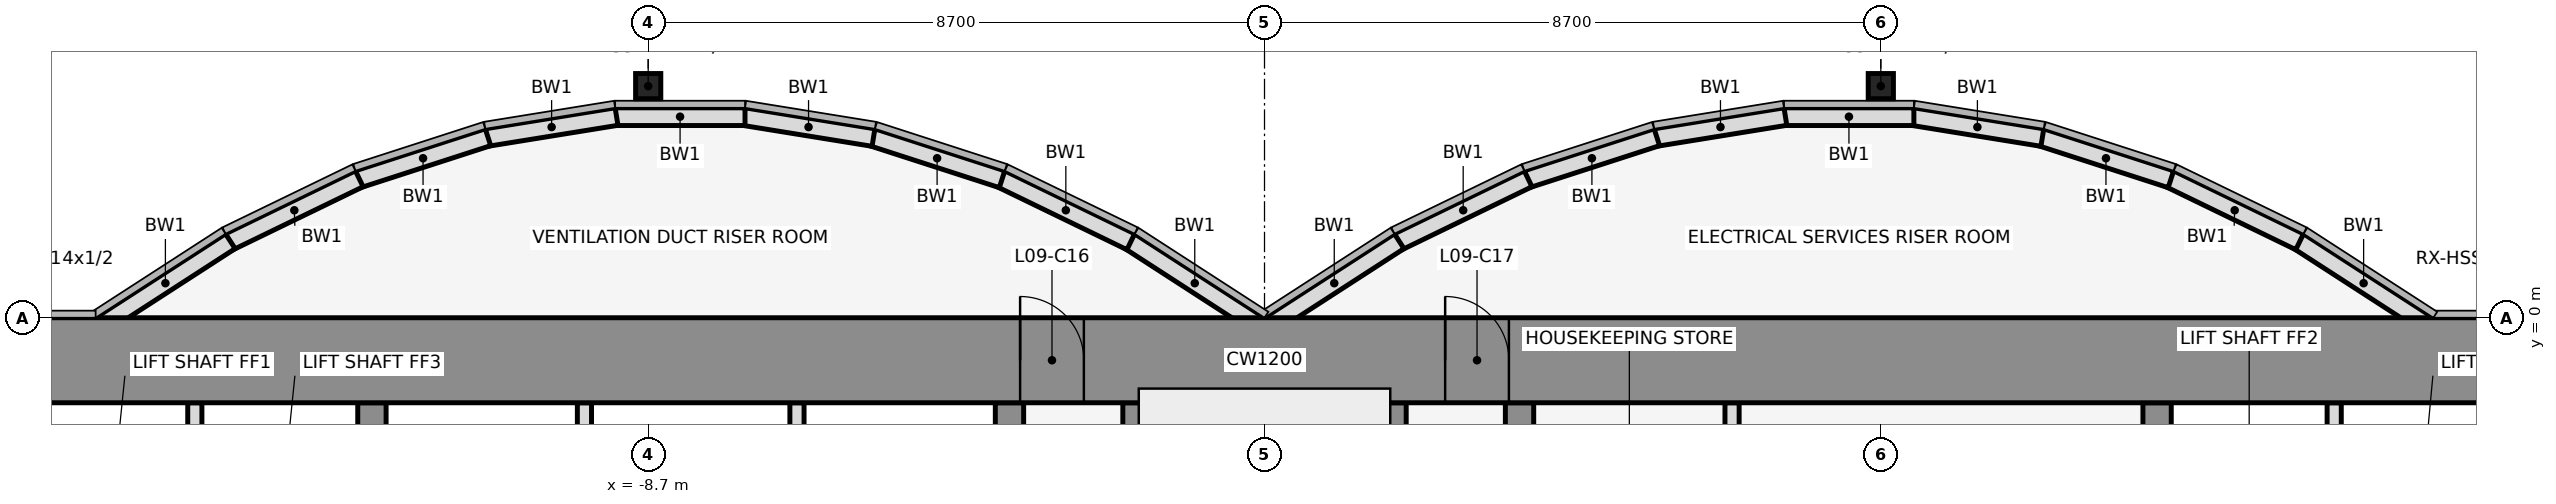
"""IFC4 building model, lengths in metres.
Left out: names, types, materials, properties, quantities, classifications, styles, units other than length and angle.
Written with IfcOpenShell. Run it as: python <this file> out.ifc"""

import sys

from ifc_helpers import new_model, si_unit, direction, frame, frame_2d, origin, origin_2d, place, context, subcontext, project, spatial, rectangle, hollow_rectangle, extrude, element, fill, save


model = new_model("IFC4")
c1 = context("Model", 3, precision=1e-05, world=origin(), true_north=direction((0.0, 1.0)))
c2 = subcontext(c1, "Body", "Model", "MODEL_VIEW")
j1 = project(units=[si_unit("LENGTHUNIT", "METRE"), si_unit("PLANEANGLEUNIT", "RADIAN")], contexts=[c1])
p1 = place(None, origin())
s1 = spatial("IfcSite", under=j1, at=p1, CompositionType="ELEMENT")
p2 = place(p1, origin())
s2 = spatial("IfcBuilding", under=s1, at=p2, CompositionType="ELEMENT")
p3 = place(p2, frame((0.0, 0.0, 48.5)))
s3 = spatial("IfcBuildingStorey", under=s2, at=p3, CompositionType="ELEMENT", Elevation=48.5)
for number, where, z_axis, x_axis in (
    (1, (-8.7, 3.269, 0.0), (0.0, 0.0, 1.0), (1.0, 0.0, 0.0)),
    (2, (8.7, 3.269, 0.0), (0.0, 0.0, 1.0), (1.0, 0.0, 0.0)),
):
    element("IfcColumn", number, at=place(p3, frame(where, z_axis=z_axis, x_axis=x_axis)), inside=s3, PredefinedType="COLUMN", context=c2, shape_type="SweptSolid", body=[
        extrude(hollow_rectangle(XDim=0.356, YDim=0.356, WallThickness=0.012, at=origin_2d()), origin(), (0.0, 0.0, 1.0), 4.5),
    ])
p4 = place(p3, frame((16.432, -0.105, 0.0), z_axis=(0.0, 0.0, 1.0), x_axis=(-0.83981312244, 0.542875602121, 0.0)))
e3 = element("IfcWall", 3, at=p4, inside=s3, PredefinedType="STANDARD", context=c2, shape_type="SweptSolid", body=[
    extrude(rectangle(XDim=2.183, YDim=0.25, at=frame_2d((1.091, 0.0))), origin(), (0.0, 0.0, 1.0), 4.35),
])
p5 = place(p3, frame((14.612, 1.073, 0.0), z_axis=(0.0, 0.0, 1.0), x_axis=(-0.89982408427, 0.436252928206, 0.0)))
e4 = element("IfcWall", 4, at=p5, inside=s3, PredefinedType="STANDARD", context=c2, shape_type="SweptSolid", body=[
    extrude(rectangle(XDim=2.038, YDim=0.25, at=frame_2d((1.019, 0.0))), origin(), (0.0, 0.0, 1.0), 4.35),
])
p6 = place(p3, frame((12.795, 1.955, 0.0), z_axis=(0.0, 0.0, 1.0), x_axis=(-0.951495806175, 0.307661714928, 0.0)))
e5 = element("IfcWall", 5, at=p6, inside=s3, PredefinedType="STANDARD", context=c2, shape_type="SweptSolid", body=[
    extrude(rectangle(XDim=1.927, YDim=0.25, at=frame_2d((0.963, 0.0))), origin(), (0.0, 0.0, 1.0), 4.35),
])
p7 = place(p3, frame((10.98, 2.543, 0.0), z_axis=(0.0, 0.0, 1.0), x_axis=(-0.987181718931, 0.159600293885, 0.0)))
e6 = element("IfcWall", 6, at=p7, inside=s3, PredefinedType="STANDARD", context=c2, shape_type="SweptSolid", body=[
    extrude(rectangle(XDim=1.857, YDim=0.25, at=frame_2d((0.929, 0.0))), origin(), (0.0, 0.0, 1.0), 4.35),
])
p8 = place(p3, frame((9.167, 2.838, 0.0), z_axis=(0.0, 0.0, 1.0), x_axis=(-1.0, 0.0, 0.0)))
e7 = element("IfcWall", 7, at=p8, inside=s3, PredefinedType="STANDARD", context=c2, shape_type="SweptSolid", body=[
    extrude(rectangle(XDim=1.833, YDim=0.25, at=frame_2d((0.917, 0.0))), origin(), (0.0, 0.0, 1.0), 4.35),
])
p9 = place(p3, frame((7.353, 2.84, 0.0), z_axis=(0.0, 0.0, 1.0), x_axis=(-0.987181718931, -0.159600293885, 0.0)))
e8 = element("IfcWall", 8, at=p9, inside=s3, PredefinedType="STANDARD", context=c2, shape_type="SweptSolid", body=[
    extrude(rectangle(XDim=1.857, YDim=0.25, at=frame_2d((0.929, 0.0))), origin(), (0.0, 0.0, 1.0), 4.35),
])
p10 = place(p3, frame((5.538, 2.548, 0.0), z_axis=(0.0, 0.0, 1.0), x_axis=(-0.951495806175, -0.307661714928, 0.0)))
e9 = element("IfcWall", 9, at=p10, inside=s3, PredefinedType="STANDARD", context=c2, shape_type="SweptSolid", body=[
    extrude(rectangle(XDim=1.927, YDim=0.25, at=frame_2d((0.963, 0.0))), origin(), (0.0, 0.0, 1.0), 4.35),
])
p11 = place(p3, frame((3.721, 1.962, 0.0), z_axis=(0.0, 0.0, 1.0), x_axis=(-0.89982408427, -0.436252928206, 0.0)))
e10 = element("IfcWall", 10, at=p11, inside=s3, PredefinedType="STANDARD", context=c2, shape_type="SweptSolid", body=[
    extrude(rectangle(XDim=2.038, YDim=0.25, at=frame_2d((1.019, 0.0))), origin(), (0.0, 0.0, 1.0), 4.35),
])
for number, where, z_axis, x_axis in (
    (11, (1.901, 1.08, 0.0), (0.0, 0.0, 1.0), (-0.84, -0.543, 0.0)),
    (12, (-0.068, -0.105, 0.0), (0.0, 0.0, 1.0), (-0.84, 0.543, 0.0)),
):
    element("IfcWall", number, at=place(p3, frame(where, z_axis=z_axis, x_axis=x_axis)), inside=s3, PredefinedType="STANDARD", context=c2, shape_type="SweptSolid", body=[
        extrude(rectangle(XDim=2.183, YDim=0.25, at=frame_2d((1.091, 0.0))), origin(), (0.0, 0.0, 1.0), 4.35),
    ])
p12 = place(p3, frame((-1.888, 1.073, 0.0), z_axis=(0.0, 0.0, 1.0), x_axis=(-0.89982408427, 0.436252928206, 0.0)))
e13 = element("IfcWall", 13, at=p12, inside=s3, PredefinedType="STANDARD", context=c2, shape_type="SweptSolid", body=[
    extrude(rectangle(XDim=2.038, YDim=0.25, at=frame_2d((1.019, 0.0))), origin(), (0.0, 0.0, 1.0), 4.35),
])
p13 = place(p3, frame((-3.705, 1.955, 0.0), z_axis=(0.0, 0.0, 1.0), x_axis=(-0.951495806175, 0.307661714928, 0.0)))
e14 = element("IfcWall", 14, at=p13, inside=s3, PredefinedType="STANDARD", context=c2, shape_type="SweptSolid", body=[
    extrude(rectangle(XDim=1.927, YDim=0.25, at=frame_2d((0.963, 0.0))), origin(), (0.0, 0.0, 1.0), 4.35),
])
p14 = place(p3, frame((-5.52, 2.543, 0.0), z_axis=(0.0, 0.0, 1.0), x_axis=(-0.987181718931, 0.159600293885, 0.0)))
e15 = element("IfcWall", 15, at=p14, inside=s3, PredefinedType="STANDARD", context=c2, shape_type="SweptSolid", body=[
    extrude(rectangle(XDim=1.857, YDim=0.25, at=frame_2d((0.929, 0.0))), origin(), (0.0, 0.0, 1.0), 4.35),
])
p15 = place(p3, frame((-7.333, 2.838, 0.0), z_axis=(0.0, 0.0, 1.0), x_axis=(-1.0, 0.0, 0.0)))
e16 = element("IfcWall", 16, at=p15, inside=s3, PredefinedType="STANDARD", context=c2, shape_type="SweptSolid", body=[
    extrude(rectangle(XDim=1.833, YDim=0.25, at=frame_2d((0.917, 0.0))), origin(), (0.0, 0.0, 1.0), 4.35),
])
p16 = place(p3, frame((-9.147, 2.84, 0.0), z_axis=(0.0, 0.0, 1.0), x_axis=(-0.987181718931, -0.159600293885, 0.0)))
e17 = element("IfcWall", 17, at=p16, inside=s3, PredefinedType="STANDARD", context=c2, shape_type="SweptSolid", body=[
    extrude(rectangle(XDim=1.857, YDim=0.25, at=frame_2d((0.929, 0.0))), origin(), (0.0, 0.0, 1.0), 4.35),
])
p17 = place(p3, frame((-10.962, 2.548, 0.0), z_axis=(0.0, 0.0, 1.0), x_axis=(-0.951495806175, -0.307661714928, 0.0)))
e18 = element("IfcWall", 18, at=p17, inside=s3, PredefinedType="STANDARD", context=c2, shape_type="SweptSolid", body=[
    extrude(rectangle(XDim=1.927, YDim=0.25, at=frame_2d((0.963, 0.0))), origin(), (0.0, 0.0, 1.0), 4.35),
])
p18 = place(p3, frame((-12.779, 1.962, 0.0), z_axis=(0.0, 0.0, 1.0), x_axis=(-0.89982408427, -0.436252928206, 0.0)))
e19 = element("IfcWall", 19, at=p18, inside=s3, PredefinedType="STANDARD", context=c2, shape_type="SweptSolid", body=[
    extrude(rectangle(XDim=2.038, YDim=0.25, at=frame_2d((1.019, 0.0))), origin(), (0.0, 0.0, 1.0), 4.35),
])
p19 = place(p3, frame((-14.599, 1.08, 0.0), z_axis=(0.0, 0.0, 1.0), x_axis=(-0.83981312244, -0.542875602121, 0.0)))
e20 = element("IfcWall", 20, at=p19, inside=s3, PredefinedType="STANDARD", context=c2, shape_type="SweptSolid", body=[
    extrude(rectangle(XDim=2.183, YDim=0.25, at=frame_2d((1.091, 0.0))), origin(), (0.0, 0.0, 1.0), 4.35),
])
p20 = place(p3, frame((-15.1, -4.6, 0.0), z_axis=(0.0, 0.0, 1.0), x_axis=(0.0, 1.0, 0.0)))
e21 = element("IfcWall", 21, at=p20, inside=s3, PredefinedType="PARTITIONING", context=c2, shape_type="SweptSolid", body=[
    extrude(rectangle(XDim=3.4, YDim=0.2, at=frame_2d((1.7, 0.0))), origin(), (0.0, 0.0, 1.0), 3.418),
])
p21 = place(p3, frame((-12.6, -11.8, 0.0), z_axis=(0.0, 0.0, 1.0), x_axis=(0.0, 1.0, 0.0)))
e22 = element("IfcWall", 22, at=p21, inside=s3, PredefinedType="SHEAR", context=c2, shape_type="SweptSolid", body=[
    extrude(rectangle(XDim=10.6, YDim=0.4, at=frame_2d((5.3, 0.0))), origin(), (0.0, 0.0, 1.0), 4.5),
])
p22 = place(p21, frame((4.75, 0.0, 0.0)))
e23 = element("IfcOpeningElement", 23, at=p22, cuts=e22, PredefinedType="OPENING", context=c2, shape_type="SweptSolid", body=[
    extrude(rectangle(XDim=1.1, YDim=2.1, at=frame_2d((0.55, 1.05))), frame((0.0, 0.212, 0.0), z_axis=(0.0, -1.0, 0.0), x_axis=(1.0, 0.0, 0.0)), (0.0, 0.0, 1.0), 0.424),
])
for number, where, z_axis, x_axis in (
    (24, (-9.6, -4.6, 0.0), (0.0, 0.0, 1.0), (0.0, 1.0, 0.0)),
    (25, (-6.6, -4.6, 0.0), (0.0, 0.0, 1.0), (0.0, 1.0, 0.0)),
):
    element("IfcWall", number, at=place(p3, frame(where, z_axis=z_axis, x_axis=x_axis)), inside=s3, PredefinedType="PARTITIONING", context=c2, shape_type="SweptSolid", body=[
        extrude(rectangle(XDim=3.4, YDim=0.2, at=frame_2d((1.7, 0.0))), origin(), (0.0, 0.0, 1.0), 3.418),
    ])
p23 = place(p3, frame((-3.6, -11.8, 0.0), z_axis=(0.0, 0.0, 1.0), x_axis=(0.0, 1.0, 0.0)))
e26 = element("IfcWall", 26, at=p23, inside=s3, PredefinedType="SHEAR", context=c2, shape_type="SweptSolid", body=[
    extrude(rectangle(XDim=10.6, YDim=0.4, at=frame_2d((5.3, 0.0))), origin(), (0.0, 0.0, 1.0), 4.5),
])
p24 = place(p23, frame((4.85, 0.0, 0.0)))
e27 = element("IfcOpeningElement", 27, at=p24, cuts=e26, PredefinedType="OPENING", context=c2, shape_type="SweptSolid", body=[
    extrude(rectangle(XDim=0.9, YDim=2.1, at=frame_2d((0.45, 1.05))), frame((0.0, 0.212, 0.0), z_axis=(0.0, -1.0, 0.0), x_axis=(1.0, 0.0, 0.0)), (0.0, 0.0, 1.0), 0.424),
])
for number, where, z_axis, x_axis in (
    (28, (-1.8, -11.8, 0.0), (0.0, 0.0, 1.0), (0.0, 1.0, 0.0)),
    (29, (1.8, -11.8, 0.0), (0.0, 0.0, 1.0), (0.0, 1.0, 0.0)),
):
    element("IfcWall", number, at=place(p3, frame(where, z_axis=z_axis, x_axis=x_axis)), inside=s3, PredefinedType="SHEAR", context=c2, shape_type="SweptSolid", body=[
        extrude(rectangle(XDim=10.6, YDim=0.4, at=frame_2d((5.3, 0.0))), origin(), (0.0, 0.0, 1.0), 4.5),
    ])
p25 = place(p3, frame((3.6, -11.8, 0.0), z_axis=(0.0, 0.0, 1.0), x_axis=(0.0, 1.0, 0.0)))
e30 = element("IfcWall", 30, at=p25, inside=s3, PredefinedType="SHEAR", context=c2, shape_type="SweptSolid", body=[
    extrude(rectangle(XDim=10.6, YDim=0.4, at=frame_2d((5.3, 0.0))), origin(), (0.0, 0.0, 1.0), 4.5),
])
p26 = place(p25, frame((1.35, 0.0, 0.0)))
e31 = element("IfcOpeningElement", 31, at=p26, cuts=e30, PredefinedType="OPENING", context=c2, shape_type="SweptSolid", body=[
    extrude(rectangle(XDim=0.9, YDim=2.1, at=frame_2d((0.45, 1.05))), frame((0.0, 0.212, 0.0), z_axis=(0.0, -1.0, 0.0), x_axis=(1.0, 0.0, 0.0)), (0.0, 0.0, 1.0), 0.424),
])
p27 = place(p3, frame((6.6, -4.6, 0.0), z_axis=(0.0, 0.0, 1.0), x_axis=(0.0, 1.0, 0.0)))
e32 = element("IfcWall", 32, at=p27, inside=s3, PredefinedType="PARTITIONING", context=c2, shape_type="SweptSolid", body=[
    extrude(rectangle(XDim=3.4, YDim=0.2, at=frame_2d((1.7, 0.0))), origin(), (0.0, 0.0, 1.0), 3.418),
])
p28 = place(p3, frame((12.6, -11.8, 0.0), z_axis=(0.0, 0.0, 1.0), x_axis=(0.0, 1.0, 0.0)))
e33 = element("IfcWall", 33, at=p28, inside=s3, PredefinedType="SHEAR", context=c2, shape_type="SweptSolid", body=[
    extrude(rectangle(XDim=10.6, YDim=0.4, at=frame_2d((5.3, 0.0))), origin(), (0.0, 0.0, 1.0), 4.5),
])
p29 = place(p28, frame((4.75, 0.0, 0.0)))
e34 = element("IfcOpeningElement", 34, at=p29, cuts=e33, PredefinedType="OPENING", context=c2, shape_type="SweptSolid", body=[
    extrude(rectangle(XDim=1.1, YDim=2.1, at=frame_2d((0.55, 1.05))), frame((0.0, 0.212, 0.0), z_axis=(0.0, -1.0, 0.0), x_axis=(1.0, 0.0, 0.0)), (0.0, 0.0, 1.0), 0.424),
])
p30 = place(p3, frame((15.1, -4.6, 0.0), z_axis=(0.0, 0.0, 1.0), x_axis=(0.0, 1.0, 0.0)))
e35 = element("IfcWall", 35, at=p30, inside=s3, PredefinedType="PARTITIONING", context=c2, shape_type="SweptSolid", body=[
    extrude(rectangle(XDim=3.4, YDim=0.2, at=frame_2d((1.7, 0.0))), origin(), (0.0, 0.0, 1.0), 3.418),
])
p31 = place(p3, frame((-22.0, -0.6, 0.0), z_axis=(0.0, 0.0, 1.0), x_axis=(1.0, 0.0, 0.0)))
e36 = element("IfcWall", 36, at=p31, inside=s3, PredefinedType="SHEAR", context=c2, shape_type="SweptSolid", body=[
    extrude(rectangle(XDim=44.0, YDim=1.2, at=frame_2d((22.0, 0.0))), origin(), (0.0, 0.0, 1.0), 4.5),
])
p32 = place(p31, frame((18.55, 0.0, 0.0)))
e37 = element("IfcOpeningElement", 37, at=p32, cuts=e36, PredefinedType="OPENING", context=c2, shape_type="SweptSolid", body=[
    extrude(rectangle(XDim=0.9, YDim=2.1, at=frame_2d((0.45, 1.05))), frame((0.0, 0.612, 0.0), z_axis=(0.0, -1.0, 0.0), x_axis=(1.0, 0.0, 0.0)), (0.0, 0.0, 1.0), 1.224),
])
p33 = place(p31, frame((24.55, 0.0, 0.0)))
e38 = element("IfcOpeningElement", 38, at=p33, cuts=e36, PredefinedType="OPENING", context=c2, shape_type="SweptSolid", body=[
    extrude(rectangle(XDim=0.9, YDim=2.1, at=frame_2d((0.45, 1.05))), frame((0.0, 0.612, 0.0), z_axis=(0.0, -1.0, 0.0), x_axis=(1.0, 0.0, 0.0)), (0.0, 0.0, 1.0), 1.224),
])
p34 = place(p32, origin())
e39 = element("IfcDoor", 39, at=p34, inside=s3, OperationType="SINGLE_SWING_LEFT", PredefinedType="DOOR", context=c2, shape_type="SweptSolid", body=[
    extrude(rectangle(XDim=0.9, YDim=2.1, at=frame_2d((0.45, 1.05))), frame((0.0, 0.025, 0.0), z_axis=(0.0, -1.0, 0.0), x_axis=(1.0, 0.0, 0.0)), (0.0, 0.0, 1.0), 0.05),
])
fill(e37, e39)
p35 = place(p33, origin())
e40 = element("IfcDoor", 40, at=p35, inside=s3, OperationType="SINGLE_SWING_LEFT", PredefinedType="DOOR", context=c2, shape_type="SweptSolid", body=[
    extrude(rectangle(XDim=0.9, YDim=2.1, at=frame_2d((0.45, 1.05))), frame((0.0, 0.025, 0.0), z_axis=(0.0, -1.0, 0.0), x_axis=(1.0, 0.0, 0.0)), (0.0, 0.0, 1.0), 0.05),
])
fill(e38, e40)
save(model, sys.argv[1])
